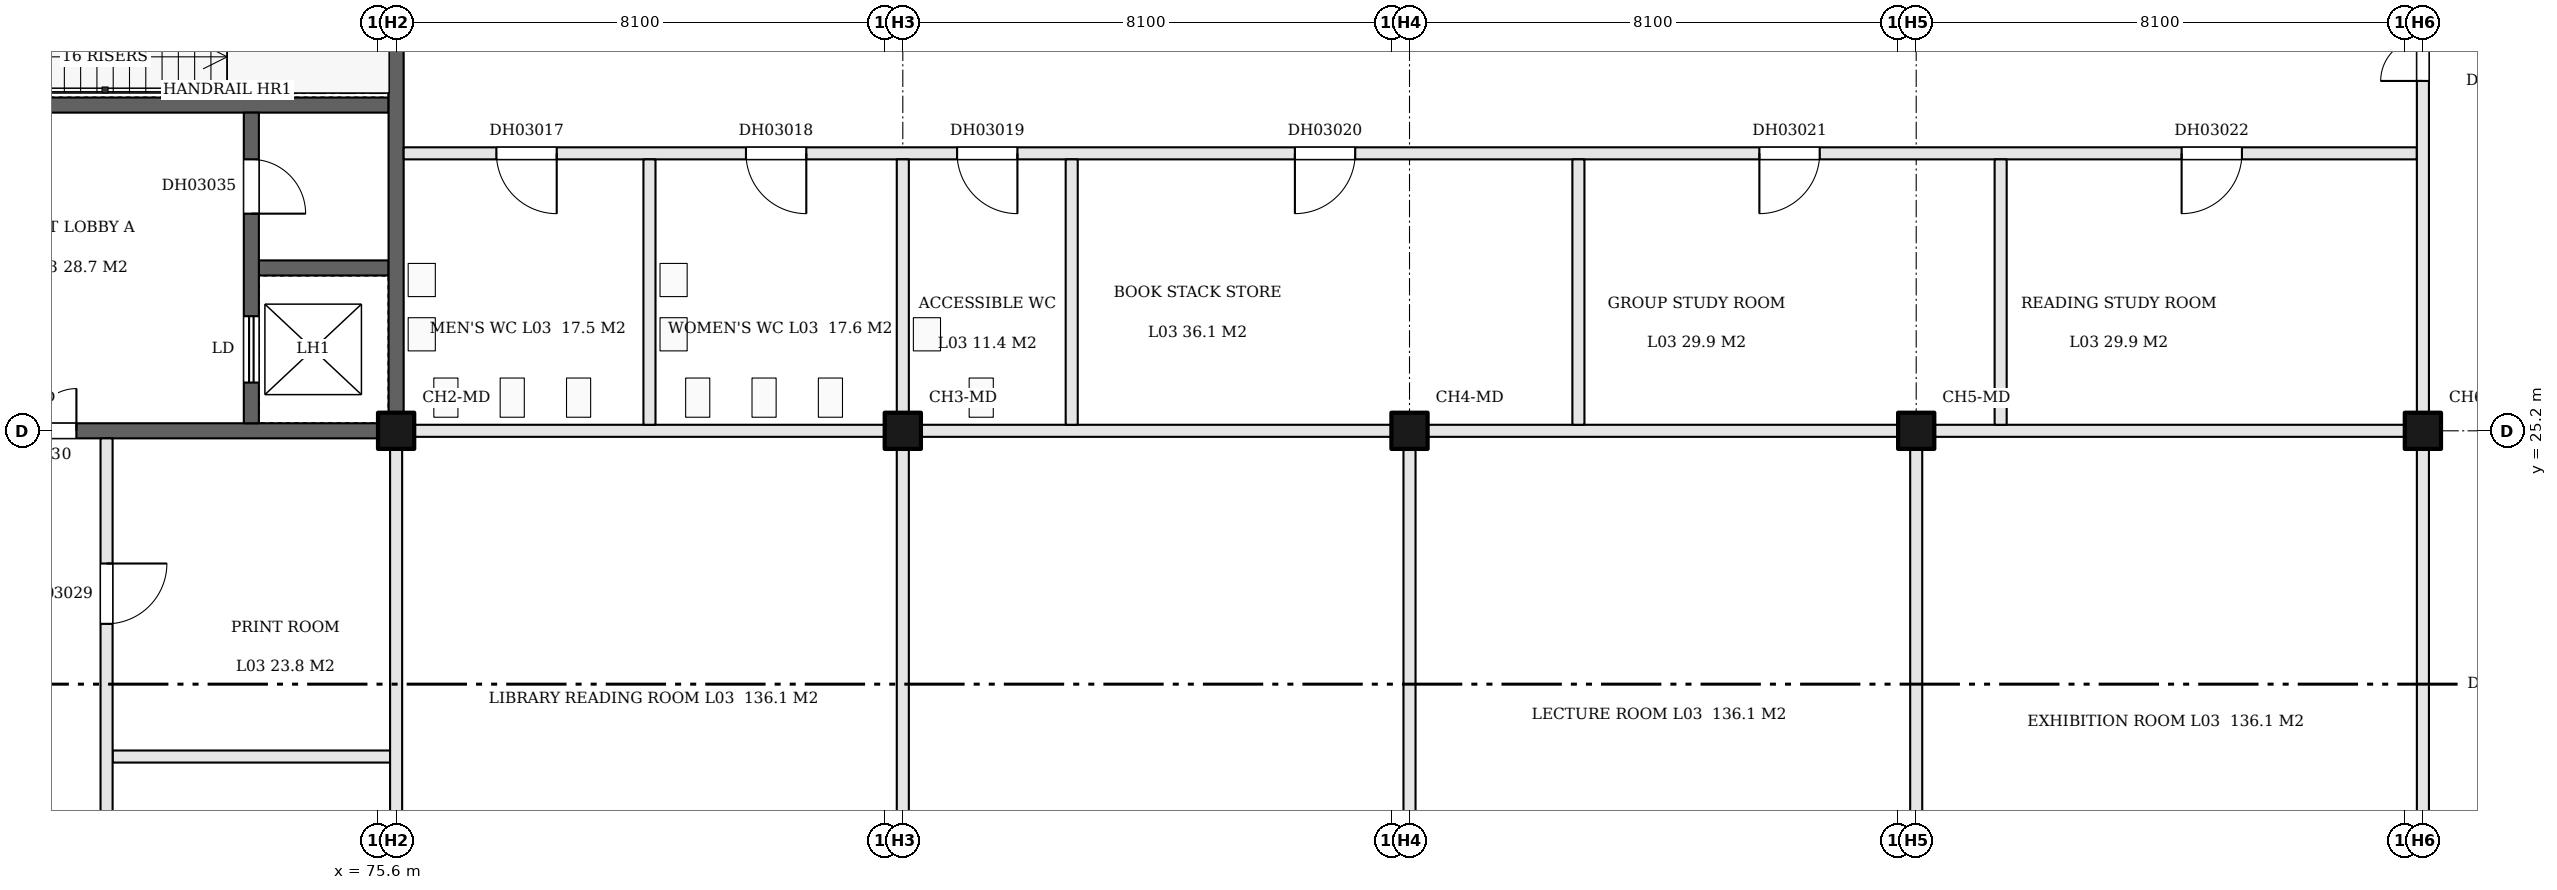
"""IFC4 building model, lengths in metres.
Left out: names, types, materials, properties, quantities, classifications, styles, units other than length and angle.
Written with IfcOpenShell. Run it as: python <this file> out.ifc"""

import sys

from ifc_helpers import new_model, si_unit, direction, frame, frame_2d, origin, origin_2d, place, context, subcontext, project, spatial, rectangle, extrude, element, fill, save


model = new_model("IFC4")
c1 = context("Model", 3, precision=1e-05, world=origin(), true_north=direction((0.0, 1.0)))
c2 = subcontext(c1, "Body", "Model", "MODEL_VIEW")
j1 = project(units=[si_unit("LENGTHUNIT", "METRE"), si_unit("PLANEANGLEUNIT", "RADIAN")], contexts=[c1])
p1 = place(None, origin())
s1 = spatial("IfcSite", under=j1, at=p1, CompositionType="ELEMENT")
p2 = place(p1, origin())
s2 = spatial("IfcBuilding", under=s1, at=p2, CompositionType="ELEMENT")
p3 = place(p2, frame((0.0, 0.0, 19.8)))
s3 = spatial("IfcBuildingStorey", under=s2, at=p3, CompositionType="ELEMENT", Elevation=19.8)
for number, where, z_axis, x_axis in (
    (1, (75.9, 25.2, 0.0), (0.0, 0.0, 1.0), (1.0, 0.0, 0.0)),
    (2, (84.3, 25.2, 0.0), (0.0, 0.0, 1.0), (1.0, 0.0, 0.0)),
    (3, (92.7, 25.2, 0.0), (0.0, 0.0, 1.0), (1.0, 0.0, 0.0)),
    (4, (101.1, 25.2, 0.0), (0.0, 0.0, 1.0), (1.0, 0.0, 0.0)),
    (5, (109.5, 25.2, 0.0), (0.0, 0.0, 1.0), (1.0, 0.0, 0.0)),
):
    element("IfcColumn", number, at=place(p3, frame(where, z_axis=z_axis, x_axis=x_axis)), inside=s3, PredefinedType="COLUMN", context=c2, shape_type="SweptSolid", body=[
        extrude(rectangle(XDim=0.6, YDim=0.6, at=origin_2d()), origin(), (0.0, 0.0, 1.0), 5.0),
    ])
p4 = place(p3, frame((71.2, 19.8, 0.0), z_axis=(0.0, 0.0, 1.0), x_axis=(1.0, 0.0, 0.0)))
e6 = element("IfcWall", 6, at=p4, inside=s3, PredefinedType="PARTITIONING", context=c2, shape_type="SweptSolid", body=[
    extrude(rectangle(XDim=4.6, YDim=0.2, at=frame_2d((2.3, 0.0))), origin(), (0.0, 0.0, 1.0), 5.0),
])
p5 = place(p3, frame((69.0, 25.2, 0.0), z_axis=(0.0, 0.0, 1.0), x_axis=(1.0, 0.0, 0.0)))
e7 = element("IfcWall", 7, at=p5, inside=s3, PredefinedType="SHEAR", context=c2, shape_type="SweptSolid", body=[
    extrude(rectangle(XDim=6.6, YDim=0.25, at=frame_2d((3.3, 0.0))), origin(), (0.0, 0.0, 1.0), 5.0),
])
p6 = place(p5, frame((0.2, 0.0, 0.0)))
e8 = element("IfcOpeningElement", 8, at=p6, cuts=e7, PredefinedType="OPENING", context=c2, shape_type="SweptSolid", body=[
    extrude(rectangle(XDim=1.4, YDim=2.1, at=frame_2d((0.7, 1.05))), frame((0.0, 0.135, 0.0), z_axis=(0.0, -1.0, 0.0), x_axis=(1.0, 0.0, 0.0)), (0.0, 0.0, 1.0), 0.27),
])
p7 = place(p3, frame((76.2, 25.2, 0.0), z_axis=(0.0, 0.0, 1.0), x_axis=(1.0, 0.0, 0.0)))
e9 = element("IfcWall", 9, at=p7, inside=s3, PredefinedType="PARTITIONING", context=c2, shape_type="SweptSolid", body=[
    extrude(rectangle(XDim=7.8, YDim=0.2, at=frame_2d((3.9, 0.0))), origin(), (0.0, 0.0, 1.0), 5.0),
])
p8 = place(p3, frame((84.6, 25.2, 0.0), z_axis=(0.0, 0.0, 1.0), x_axis=(1.0, 0.0, 0.0)))
e10 = element("IfcWall", 10, at=p8, inside=s3, PredefinedType="PARTITIONING", context=c2, shape_type="SweptSolid", body=[
    extrude(rectangle(XDim=7.8, YDim=0.2, at=frame_2d((3.9, 0.0))), origin(), (0.0, 0.0, 1.0), 5.0),
])
for number, where, z_axis, x_axis in (
    (11, (93.0, 25.2, 0.0), (0.0, 0.0, 1.0), (1.0, 0.0, 0.0)),
    (12, (101.4, 25.2, 0.0), (0.0, 0.0, 1.0), (1.0, 0.0, 0.0)),
):
    element("IfcWall", number, at=place(p3, frame(where, z_axis=z_axis, x_axis=x_axis)), inside=s3, PredefinedType="PARTITIONING", context=c2, shape_type="SweptSolid", body=[
        extrude(rectangle(XDim=7.8, YDim=0.2, at=frame_2d((3.9, 0.0))), origin(), (0.0, 0.0, 1.0), 5.0),
    ])
p9 = place(p3, frame((73.625, 27.9, 0.0), z_axis=(0.0, 0.0, 1.0), x_axis=(1.0, 0.0, 0.0)))
e13 = element("IfcWall", 13, at=p9, inside=s3, PredefinedType="SHEAR", context=c2, shape_type="SweptSolid", body=[
    extrude(rectangle(XDim=2.15, YDim=0.25, at=frame_2d((1.075, 0.0))), origin(), (0.0, 0.0, 1.0), 5.0),
])
p10 = place(p3, frame((76.025, 29.8, 0.0), z_axis=(0.0, 0.0, 1.0), x_axis=(1.0, 0.0, 0.0)))
e14 = element("IfcWall", 14, at=p10, inside=s3, PredefinedType="PARTITIONING", context=c2, shape_type="SweptSolid", body=[
    extrude(rectangle(XDim=33.375, YDim=0.2, at=frame_2d((16.688, 0.0))), origin(), (0.0, 0.0, 1.0), 5.0),
])
p11 = place(p10, frame((1.538, 0.0, 0.0)))
e15 = element("IfcOpeningElement", 15, at=p11, cuts=e14, PredefinedType="OPENING", context=c2, shape_type="SweptSolid", body=[
    extrude(rectangle(XDim=1.0, YDim=2.1, at=frame_2d((0.5, 1.05))), frame((0.0, 0.11, 0.0), z_axis=(0.0, -1.0, 0.0), x_axis=(1.0, 0.0, 0.0)), (0.0, 0.0, 1.0), 0.22),
])
p12 = place(p10, frame((5.675, 0.0, 0.0)))
e16 = element("IfcOpeningElement", 16, at=p12, cuts=e14, PredefinedType="OPENING", context=c2, shape_type="SweptSolid", body=[
    extrude(rectangle(XDim=1.0, YDim=2.1, at=frame_2d((0.5, 1.05))), frame((0.0, 0.11, 0.0), z_axis=(0.0, -1.0, 0.0), x_axis=(1.0, 0.0, 0.0)), (0.0, 0.0, 1.0), 0.22),
])
p13 = place(p10, frame((9.175, 0.0, 0.0)))
e17 = element("IfcOpeningElement", 17, at=p13, cuts=e14, PredefinedType="OPENING", context=c2, shape_type="SweptSolid", body=[
    extrude(rectangle(XDim=1.0, YDim=2.1, at=frame_2d((0.5, 1.05))), frame((0.0, 0.11, 0.0), z_axis=(0.0, -1.0, 0.0), x_axis=(1.0, 0.0, 0.0)), (0.0, 0.0, 1.0), 0.22),
])
p14 = place(p10, frame((14.775, 0.0, 0.0)))
e18 = element("IfcOpeningElement", 18, at=p14, cuts=e14, PredefinedType="OPENING", context=c2, shape_type="SweptSolid", body=[
    extrude(rectangle(XDim=1.0, YDim=2.1, at=frame_2d((0.5, 1.05))), frame((0.0, 0.11, 0.0), z_axis=(0.0, -1.0, 0.0), x_axis=(1.0, 0.0, 0.0)), (0.0, 0.0, 1.0), 0.22),
])
p15 = place(p10, frame((22.475, 0.0, 0.0)))
e19 = element("IfcOpeningElement", 19, at=p15, cuts=e14, PredefinedType="OPENING", context=c2, shape_type="SweptSolid", body=[
    extrude(rectangle(XDim=1.0, YDim=2.1, at=frame_2d((0.5, 1.05))), frame((0.0, 0.11, 0.0), z_axis=(0.0, -1.0, 0.0), x_axis=(1.0, 0.0, 0.0)), (0.0, 0.0, 1.0), 0.22),
])
p16 = place(p10, frame((29.475, 0.0, 0.0)))
e20 = element("IfcOpeningElement", 20, at=p16, cuts=e14, PredefinedType="OPENING", context=c2, shape_type="SweptSolid", body=[
    extrude(rectangle(XDim=1.0, YDim=2.1, at=frame_2d((0.5, 1.05))), frame((0.0, 0.11, 0.0), z_axis=(0.0, -1.0, 0.0), x_axis=(1.0, 0.0, 0.0)), (0.0, 0.0, 1.0), 0.22),
])
p17 = place(p3, frame((67.8, 30.6, 0.0), z_axis=(0.0, 0.0, 1.0), x_axis=(1.0, 0.0, 0.0)))
e21 = element("IfcWall", 21, at=p17, inside=s3, PredefinedType="SHEAR", context=c2, shape_type="SweptSolid", body=[
    extrude(rectangle(XDim=7.975, YDim=0.25, at=frame_2d((3.987, 0.0))), origin(), (0.0, 0.0, 1.0), 5.0),
])
p18 = place(p17, frame((0.2, 0.0, 0.0)))
e22 = element("IfcOpeningElement", 22, at=p18, cuts=e21, PredefinedType="OPENING", context=c2, shape_type="SweptSolid", body=[
    extrude(rectangle(XDim=1.0, YDim=2.1, at=frame_2d((0.5, 1.05))), frame((0.0, 0.135, 0.0), z_axis=(0.0, -1.0, 0.0), x_axis=(1.0, 0.0, 0.0)), (0.0, 0.0, 1.0), 0.27),
])
p19 = place(p3, frame((71.1, 8.5, 0.0), z_axis=(0.0, 0.0, 1.0), x_axis=(0.0, 1.0, 0.0)))
e23 = element("IfcWall", 23, at=p19, inside=s3, PredefinedType="PARTITIONING", context=c2, shape_type="SweptSolid", body=[
    extrude(rectangle(XDim=16.575, YDim=0.2, at=frame_2d((8.288, 0.0))), origin(), (0.0, 0.0, 1.0), 5.0),
])
p20 = place(p19, frame((1.9, 0.0, 0.0)))
e24 = element("IfcOpeningElement", 24, at=p20, cuts=e23, PredefinedType="OPENING", context=c2, shape_type="SweptSolid", body=[
    extrude(rectangle(XDim=1.0, YDim=2.1, at=frame_2d((0.5, 1.05))), frame((0.0, 0.11, 0.0), z_axis=(0.0, -1.0, 0.0), x_axis=(1.0, 0.0, 0.0)), (0.0, 0.0, 1.0), 0.22),
])
p21 = place(p19, frame((7.6, 0.0, 0.0)))
e25 = element("IfcOpeningElement", 25, at=p21, cuts=e23, PredefinedType="OPENING", context=c2, shape_type="SweptSolid", body=[
    extrude(rectangle(XDim=1.0, YDim=2.1, at=frame_2d((0.5, 1.05))), frame((0.0, 0.11, 0.0), z_axis=(0.0, -1.0, 0.0), x_axis=(1.0, 0.0, 0.0)), (0.0, 0.0, 1.0), 0.22),
])
p22 = place(p19, frame((13.5, 0.0, 0.0)))
e26 = element("IfcOpeningElement", 26, at=p22, cuts=e23, PredefinedType="OPENING", context=c2, shape_type="SweptSolid", body=[
    extrude(rectangle(XDim=1.0, YDim=2.1, at=frame_2d((0.5, 1.05))), frame((0.0, 0.11, 0.0), z_axis=(0.0, -1.0, 0.0), x_axis=(1.0, 0.0, 0.0)), (0.0, 0.0, 1.0), 0.22),
])
p23 = place(p3, frame((73.5, 25.325, 0.0), z_axis=(0.0, 0.0, 1.0), x_axis=(0.0, 1.0, 0.0)))
e27 = element("IfcWall", 27, at=p23, inside=s3, PredefinedType="SHEAR", context=c2, shape_type="SweptSolid", body=[
    extrude(rectangle(XDim=5.15, YDim=0.25, at=frame_2d((2.575, 0.0))), origin(), (0.0, 0.0, 1.0), 5.0),
])
p24 = place(p23, frame((0.675, 0.0, 0.0)))
e28 = element("IfcOpeningElement", 28, at=p24, cuts=e27, PredefinedType="OPENING", context=c2, shape_type="SweptSolid", body=[
    extrude(rectangle(XDim=1.1, YDim=2.1, at=frame_2d((0.55, 1.05))), frame((0.0, 0.135, 0.0), z_axis=(0.0, -1.0, 0.0), x_axis=(1.0, 0.0, 0.0)), (0.0, 0.0, 1.0), 0.27),
])
p25 = place(p23, frame((3.475, 0.0, 0.0)))
e29 = element("IfcOpeningElement", 29, at=p25, cuts=e27, PredefinedType="OPENING", context=c2, shape_type="SweptSolid", body=[
    extrude(rectangle(XDim=0.9, YDim=2.1, at=frame_2d((0.45, 1.05))), frame((0.0, 0.135, 0.0), z_axis=(0.0, -1.0, 0.0), x_axis=(1.0, 0.0, 0.0)), (0.0, 0.0, 1.0), 0.27),
])
p26 = place(p3, frame((75.9, 17.1, 0.0), z_axis=(0.0, 0.0, 1.0), x_axis=(0.0, 1.0, 0.0)))
e30 = element("IfcWall", 30, at=p26, inside=s3, PredefinedType="PARTITIONING", context=c2, shape_type="SweptSolid", body=[
    extrude(rectangle(XDim=7.8, YDim=0.2, at=frame_2d((3.9, 0.0))), origin(), (0.0, 0.0, 1.0), 5.0),
])
p27 = place(p3, frame((75.9, 25.5, 0.0), z_axis=(0.0, 0.0, 1.0), x_axis=(0.0, 1.0, 0.0)))
e31 = element("IfcWall", 31, at=p27, inside=s3, PredefinedType="SHEAR", context=c2, shape_type="SweptSolid", body=[
    extrude(rectangle(XDim=7.2, YDim=0.25, at=frame_2d((3.6, 0.0))), origin(), (0.0, 0.0, 1.0), 5.0),
])
p28 = place(p3, frame((80.1, 25.3, 0.0), z_axis=(0.0, 0.0, 1.0), x_axis=(0.0, 1.0, 0.0)))
e32 = element("IfcWall", 32, at=p28, inside=s3, PredefinedType="PARTITIONING", context=c2, shape_type="SweptSolid", body=[
    extrude(rectangle(XDim=4.4, YDim=0.2, at=frame_2d((2.2, 0.0))), origin(), (0.0, 0.0, 1.0), 5.0),
])
p29 = place(p3, frame((84.3, 17.1, 0.0), z_axis=(0.0, 0.0, 1.0), x_axis=(0.0, 1.0, 0.0)))
e33 = element("IfcWall", 33, at=p29, inside=s3, PredefinedType="PARTITIONING", context=c2, shape_type="SweptSolid", body=[
    extrude(rectangle(XDim=7.8, YDim=0.2, at=frame_2d((3.9, 0.0))), origin(), (0.0, 0.0, 1.0), 5.0),
])
p30 = place(p3, frame((84.3, 25.5, 0.0), z_axis=(0.0, 0.0, 1.0), x_axis=(0.0, 1.0, 0.0)))
e34 = element("IfcWall", 34, at=p30, inside=s3, PredefinedType="PARTITIONING", context=c2, shape_type="SweptSolid", body=[
    extrude(rectangle(XDim=4.2, YDim=0.2, at=frame_2d((2.1, 0.0))), origin(), (0.0, 0.0, 1.0), 5.0),
])
p31 = place(p3, frame((87.1, 25.3, 0.0), z_axis=(0.0, 0.0, 1.0), x_axis=(0.0, 1.0, 0.0)))
e35 = element("IfcWall", 35, at=p31, inside=s3, PredefinedType="PARTITIONING", context=c2, shape_type="SweptSolid", body=[
    extrude(rectangle(XDim=4.4, YDim=0.2, at=frame_2d((2.2, 0.0))), origin(), (0.0, 0.0, 1.0), 5.0),
])
p32 = place(p3, frame((92.7, 17.1, 0.0), z_axis=(0.0, 0.0, 1.0), x_axis=(0.0, 1.0, 0.0)))
e36 = element("IfcWall", 36, at=p32, inside=s3, PredefinedType="PARTITIONING", context=c2, shape_type="SweptSolid", body=[
    extrude(rectangle(XDim=7.8, YDim=0.2, at=frame_2d((3.9, 0.0))), origin(), (0.0, 0.0, 1.0), 5.0),
])
p33 = place(p3, frame((95.5, 25.3, 0.0), z_axis=(0.0, 0.0, 1.0), x_axis=(0.0, 1.0, 0.0)))
e37 = element("IfcWall", 37, at=p33, inside=s3, PredefinedType="PARTITIONING", context=c2, shape_type="SweptSolid", body=[
    extrude(rectangle(XDim=4.4, YDim=0.2, at=frame_2d((2.2, 0.0))), origin(), (0.0, 0.0, 1.0), 5.0),
])
p34 = place(p3, frame((101.1, 17.1, 0.0), z_axis=(0.0, 0.0, 1.0), x_axis=(0.0, 1.0, 0.0)))
e38 = element("IfcWall", 38, at=p34, inside=s3, PredefinedType="PARTITIONING", context=c2, shape_type="SweptSolid", body=[
    extrude(rectangle(XDim=7.8, YDim=0.2, at=frame_2d((3.9, 0.0))), origin(), (0.0, 0.0, 1.0), 5.0),
])
p35 = place(p3, frame((102.5, 25.3, 0.0), z_axis=(0.0, 0.0, 1.0), x_axis=(0.0, 1.0, 0.0)))
e39 = element("IfcWall", 39, at=p35, inside=s3, PredefinedType="PARTITIONING", context=c2, shape_type="SweptSolid", body=[
    extrude(rectangle(XDim=4.4, YDim=0.2, at=frame_2d((2.2, 0.0))), origin(), (0.0, 0.0, 1.0), 5.0),
])
p36 = place(p3, frame((109.5, 17.1, 0.0), z_axis=(0.0, 0.0, 1.0), x_axis=(0.0, 1.0, 0.0)))
e40 = element("IfcWall", 40, at=p36, inside=s3, PredefinedType="PARTITIONING", context=c2, shape_type="SweptSolid", body=[
    extrude(rectangle(XDim=7.8, YDim=0.2, at=frame_2d((3.9, 0.0))), origin(), (0.0, 0.0, 1.0), 5.0),
])
p37 = place(p3, frame((109.5, 25.5, 0.0), z_axis=(0.0, 0.0, 1.0), x_axis=(0.0, 1.0, 0.0)))
e41 = element("IfcWall", 41, at=p37, inside=s3, PredefinedType="PARTITIONING", context=c2, shape_type="SweptSolid", body=[
    extrude(rectangle(XDim=7.2, YDim=0.2, at=frame_2d((3.6, 0.0))), origin(), (0.0, 0.0, 1.0), 5.0),
])
p38 = place(p37, frame((5.5, 0.0, 0.0)))
e42 = element("IfcOpeningElement", 42, at=p38, cuts=e41, PredefinedType="OPENING", context=c2, shape_type="SweptSolid", body=[
    extrude(rectangle(XDim=1.4, YDim=2.1, at=frame_2d((0.7, 1.05))), frame((0.0, 0.11, 0.0), z_axis=(0.0, -1.0, 0.0), x_axis=(1.0, 0.0, 0.0)), (0.0, 0.0, 1.0), 0.22),
])
p39 = place(p11, frame((1.0, 0.0, 0.0), z_axis=(0.0, 0.0, 1.0), x_axis=(-1.0, 0.0, 0.0)))
e43 = element("IfcDoor", 43, at=p39, inside=s3, OperationType="SINGLE_SWING_LEFT", PredefinedType="DOOR", context=c2, shape_type="SweptSolid", body=[
    extrude(rectangle(XDim=1.0, YDim=2.1, at=frame_2d((0.5, 1.05))), frame((0.0, 0.025, 0.0), z_axis=(0.0, -1.0, 0.0), x_axis=(1.0, 0.0, 0.0)), (0.0, 0.0, 1.0), 0.05),
])
fill(e15, e43)
p40 = place(p12, frame((1.0, 0.0, 0.0), z_axis=(0.0, 0.0, 1.0), x_axis=(-1.0, 0.0, 0.0)))
e44 = element("IfcDoor", 44, at=p40, inside=s3, OperationType="SINGLE_SWING_LEFT", PredefinedType="DOOR", context=c2, shape_type="SweptSolid", body=[
    extrude(rectangle(XDim=1.0, YDim=2.1, at=frame_2d((0.5, 1.05))), frame((0.0, 0.025, 0.0), z_axis=(0.0, -1.0, 0.0), x_axis=(1.0, 0.0, 0.0)), (0.0, 0.0, 1.0), 0.05),
])
fill(e16, e44)
p41 = place(p13, frame((1.0, 0.0, 0.0), z_axis=(0.0, 0.0, 1.0), x_axis=(-1.0, 0.0, 0.0)))
e45 = element("IfcDoor", 45, at=p41, inside=s3, OperationType="SINGLE_SWING_LEFT", PredefinedType="DOOR", context=c2, shape_type="SweptSolid", body=[
    extrude(rectangle(XDim=1.0, YDim=2.1, at=frame_2d((0.5, 1.05))), frame((0.0, 0.025, 0.0), z_axis=(0.0, -1.0, 0.0), x_axis=(1.0, 0.0, 0.0)), (0.0, 0.0, 1.0), 0.05),
])
fill(e17, e45)
p42 = place(p14, frame((1.0, 0.0, 0.0), z_axis=(0.0, 0.0, 1.0), x_axis=(-1.0, 0.0, 0.0)))
e46 = element("IfcDoor", 46, at=p42, inside=s3, OperationType="SINGLE_SWING_RIGHT", PredefinedType="DOOR", context=c2, shape_type="SweptSolid", body=[
    extrude(rectangle(XDim=1.0, YDim=2.1, at=frame_2d((0.5, 1.05))), frame((0.0, 0.025, 0.0), z_axis=(0.0, -1.0, 0.0), x_axis=(1.0, 0.0, 0.0)), (0.0, 0.0, 1.0), 0.05),
])
fill(e18, e46)
p43 = place(p15, frame((1.0, 0.0, 0.0), z_axis=(0.0, 0.0, 1.0), x_axis=(-1.0, 0.0, 0.0)))
e47 = element("IfcDoor", 47, at=p43, inside=s3, OperationType="SINGLE_SWING_RIGHT", PredefinedType="DOOR", context=c2, shape_type="SweptSolid", body=[
    extrude(rectangle(XDim=1.0, YDim=2.1, at=frame_2d((0.5, 1.05))), frame((0.0, 0.025, 0.0), z_axis=(0.0, -1.0, 0.0), x_axis=(1.0, 0.0, 0.0)), (0.0, 0.0, 1.0), 0.05),
])
fill(e19, e47)
p44 = place(p16, frame((1.0, 0.0, 0.0), z_axis=(0.0, 0.0, 1.0), x_axis=(-1.0, 0.0, 0.0)))
e48 = element("IfcDoor", 48, at=p44, inside=s3, OperationType="SINGLE_SWING_RIGHT", PredefinedType="DOOR", context=c2, shape_type="SweptSolid", body=[
    extrude(rectangle(XDim=1.0, YDim=2.1, at=frame_2d((0.5, 1.05))), frame((0.0, 0.025, 0.0), z_axis=(0.0, -1.0, 0.0), x_axis=(1.0, 0.0, 0.0)), (0.0, 0.0, 1.0), 0.05),
])
fill(e20, e48)
p45 = place(p38, origin())
e49 = element("IfcDoor", 49, at=p45, inside=s3, OperationType="DOUBLE_DOOR_SINGLE_SWING", PredefinedType="DOOR", context=c2, shape_type="SweptSolid", body=[
    extrude(rectangle(XDim=1.4, YDim=2.1, at=frame_2d((0.7, 1.05))), frame((0.0, 0.025, 0.0), z_axis=(0.0, -1.0, 0.0), x_axis=(1.0, 0.0, 0.0)), (0.0, 0.0, 1.0), 0.05),
])
fill(e42, e49)
p46 = place(p22, frame((1.0, 0.0, 0.0), z_axis=(0.0, 0.0, 1.0), x_axis=(-1.0, 0.0, 0.0)))
e50 = element("IfcDoor", 50, at=p46, inside=s3, OperationType="SINGLE_SWING_LEFT", PredefinedType="DOOR", context=c2, shape_type="SweptSolid", body=[
    extrude(rectangle(XDim=1.0, YDim=2.1, at=frame_2d((0.5, 1.05))), frame((0.0, 0.025, 0.0), z_axis=(0.0, -1.0, 0.0), x_axis=(1.0, 0.0, 0.0)), (0.0, 0.0, 1.0), 0.05),
])
fill(e26, e50)
p47 = place(p6, origin())
e51 = element("IfcDoor", 51, at=p47, inside=s3, OperationType="DOUBLE_DOOR_SINGLE_SWING", PredefinedType="DOOR", context=c2, shape_type="SweptSolid", body=[
    extrude(rectangle(XDim=1.4, YDim=2.1, at=frame_2d((0.7, 1.05))), frame((0.0, 0.025, 0.0), z_axis=(0.0, -1.0, 0.0), x_axis=(1.0, 0.0, 0.0)), (0.0, 0.0, 1.0), 0.05),
])
fill(e8, e51)
p48 = place(p24, origin())
e52 = element("IfcDoor", 52, at=p48, inside=s3, OperationType="SLIDING_TO_LEFT", PredefinedType="DOOR", context=c2, shape_type="SweptSolid", body=[
    extrude(rectangle(XDim=1.1, YDim=2.1, at=frame_2d((0.55, 1.05))), frame((0.0, 0.025, 0.0), z_axis=(0.0, -1.0, 0.0), x_axis=(1.0, 0.0, 0.0)), (0.0, 0.0, 1.0), 0.05),
])
fill(e28, e52)
p49 = place(p25, frame((0.9, 0.0, 0.0), z_axis=(0.0, 0.0, 1.0), x_axis=(-1.0, 0.0, 0.0)))
e53 = element("IfcDoor", 53, at=p49, inside=s3, OperationType="SINGLE_SWING_RIGHT", PredefinedType="DOOR", context=c2, shape_type="SweptSolid", body=[
    extrude(rectangle(XDim=0.9, YDim=2.1, at=frame_2d((0.45, 1.05))), frame((0.0, 0.025, 0.0), z_axis=(0.0, -1.0, 0.0), x_axis=(1.0, 0.0, 0.0)), (0.0, 0.0, 1.0), 0.05),
])
fill(e29, e53)
save(model, sys.argv[1])
